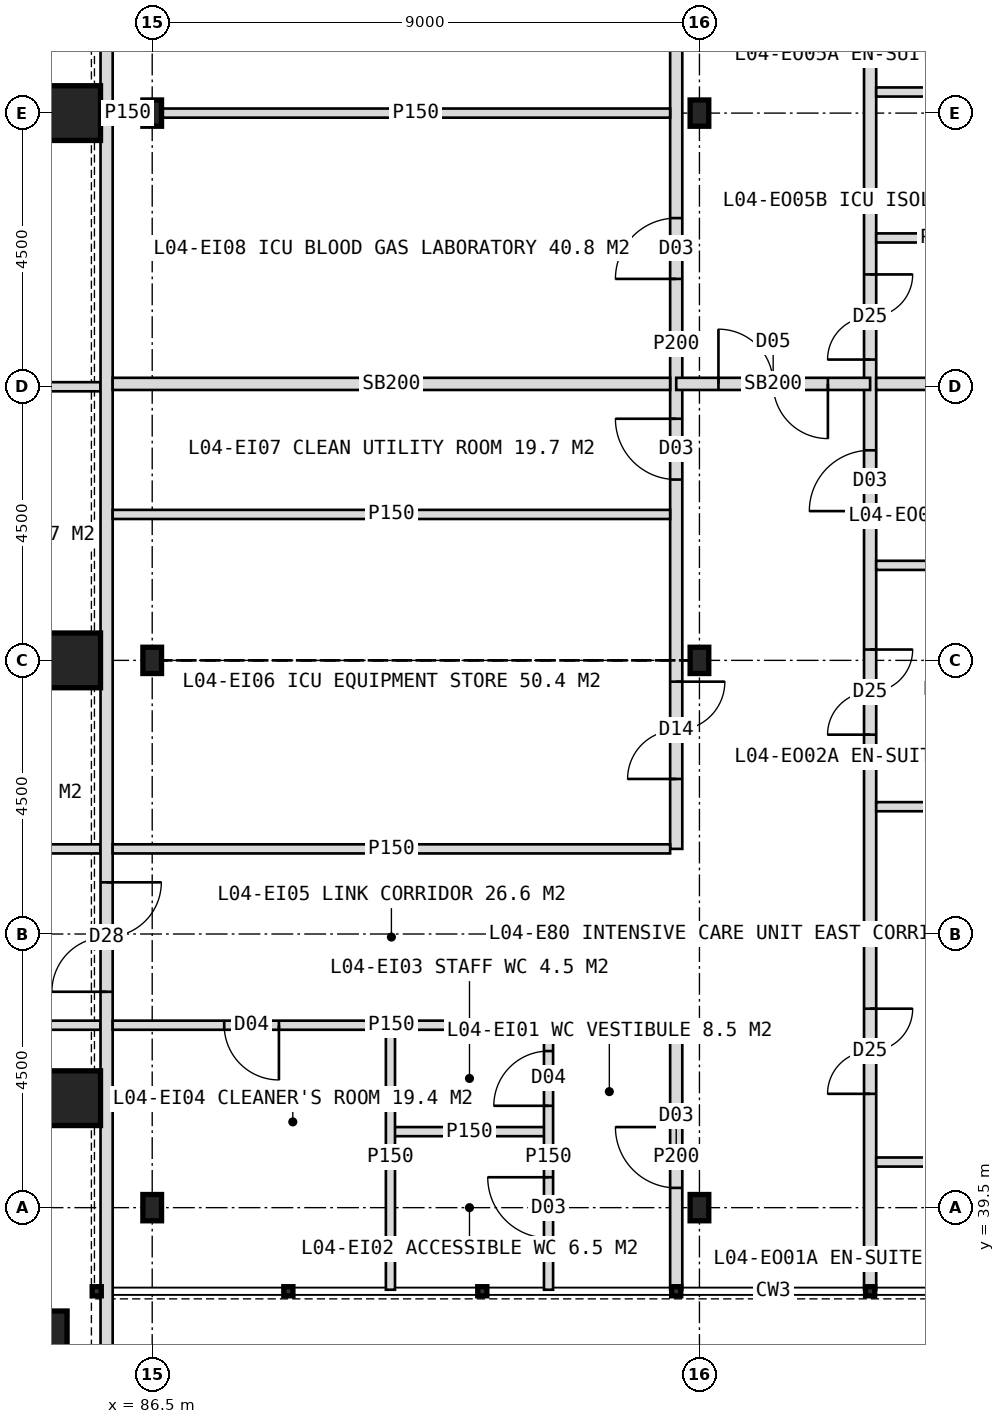
"""IFC4 building model, lengths in metres.
Left out: names, types, materials, properties, quantities, classifications, styles, units other than length and angle.
Written with IfcOpenShell. Run it as: python <this file> out.ifc"""

import sys

from ifc_helpers import new_model, si_unit, direction, frame, frame_2d, origin, origin_2d, place, context, subcontext, project, spatial, rectangle, hollow_rectangle, i_section, extrude, element, fill, save


model = new_model("IFC4")
c1 = context("Model", 3, precision=1e-05, world=origin(), true_north=direction((0.0, 1.0)))
c2 = subcontext(c1, "Body", "Model", "MODEL_VIEW")
j1 = project(units=[si_unit("LENGTHUNIT", "METRE"), si_unit("PLANEANGLEUNIT", "RADIAN")], contexts=[c1])
p1 = place(None, origin())
s1 = spatial("IfcSite", under=j1, at=p1, CompositionType="ELEMENT")
p2 = place(p1, origin())
s2 = spatial("IfcBuilding", under=s1, at=p2, CompositionType="ELEMENT")
p3 = place(p2, frame((0.0, 0.0, 21.0)))
s3 = spatial("IfcBuildingStorey", under=s2, at=p3, CompositionType="ELEMENT", Elevation=21.0)
for number, where, z_axis, x_axis in (
    (1, (85.2, 41.3, 0.0), (0.0, 0.0, 1.0), (1.0, 0.0, 0.0)),
    (2, (85.2, 48.5, 0.0), (0.0, 0.0, 1.0), (1.0, 0.0, 0.0)),
    (3, (85.2, 57.5, 0.0), (0.0, 0.0, 1.0), (1.0, 0.0, 0.0)),
    (4, (84.65, 37.35, 0.0), (0.0, 0.0, 1.0), (1.0, 0.0, 0.0)),
):
    element("IfcColumn", number, at=place(p3, frame(where, z_axis=z_axis, x_axis=x_axis)), inside=s3, PredefinedType="COLUMN", context=c2, shape_type="SweptSolid", body=[
        extrude(hollow_rectangle(XDim=0.9, YDim=0.9, WallThickness=0.08, at=origin_2d()), origin(), (0.0, 0.0, 1.0), 5.0),
    ])
for number, where, z_axis, x_axis in (
    (5, (86.5, 39.5, 0.0), (0.0, 0.0, 1.0), (1.0, 0.0, 0.0)),
    (6, (86.5, 48.5, 0.0), (0.0, 0.0, 1.0), (1.0, 0.0, 0.0)),
    (7, (86.5, 57.5, 0.0), (0.0, 0.0, 1.0), (1.0, 0.0, 0.0)),
    (8, (95.5, 39.5, 0.0), (0.0, 0.0, 1.0), (1.0, 0.0, 0.0)),
    (9, (95.5, 48.5, 0.0), (0.0, 0.0, 1.0), (1.0, 0.0, 0.0)),
    (10, (95.5, 57.5, 0.0), (0.0, 0.0, 1.0), (1.0, 0.0, 0.0)),
):
    element("IfcColumn", number, at=place(p3, frame(where, z_axis=z_axis, x_axis=x_axis)), inside=s3, PredefinedType="COLUMN", context=c2, shape_type="SweptSolid", body=[
        extrude(i_section(OverallWidth=0.307, OverallDepth=0.432, WebThickness=0.021, FlangeThickness=0.04, FilletRadius=0.027, at=origin_2d()), origin(), (0.0, 0.0, 1.0), 5.0),
    ])
for number, where, z_axis, x_axis in (
    (11, (79.5, 53.0, 0.0), (0.0, 0.0, 1.0), (1.0, 0.0, 0.0)),
    (12, (79.5, 45.4, 0.0), (0.0, 0.0, 1.0), (1.0, 0.0, 0.0)),
    (13, (79.5, 42.5, 0.0), (0.0, 0.0, 1.0), (1.0, 0.0, 0.0)),
):
    element("IfcWall", number, at=place(p3, frame(where, z_axis=z_axis, x_axis=x_axis)), inside=s3, PredefinedType="PARTITIONING", context=c2, shape_type="SweptSolid", body=[
        extrude(rectangle(XDim=6.15, YDim=0.15, at=frame_2d((3.075, 0.0))), origin(), (0.0, 0.0, 1.0), 4.7),
    ])
p4 = place(p3, frame((98.307, 38.15, 0.0), z_axis=(0.0, 0.0, 1.0), x_axis=(0.0, 1.0, 0.0)))
e14 = element("IfcWall", 14, at=p4, inside=s3, PredefinedType="PARTITIONING", context=c2, shape_type="SweptSolid", body=[
    extrude(rectangle(XDim=47.7, YDim=0.2, at=frame_2d((23.85, 0.0))), origin(), (0.0, 0.0, 1.0), 4.7),
])
p5 = place(p4, frame((45.7, 0.0, 0.0)))
e15 = element("IfcOpeningElement", 15, at=p5, cuts=e14, PredefinedType="OPENING", context=c2, shape_type="SweptSolid", body=[
    extrude(rectangle(XDim=1.2, YDim=2.1, at=frame_2d((0.6, 1.05))), frame((0.0, 0.11, 0.0), z_axis=(0.0, -1.0, 0.0), x_axis=(1.0, 0.0, 0.0)), (0.0, 0.0, 1.0), 0.22),
])
p6 = place(p4, frame((36.244, 0.0, 0.0)))
e16 = element("IfcOpeningElement", 16, at=p6, cuts=e14, PredefinedType="OPENING", context=c2, shape_type="SweptSolid", body=[
    extrude(rectangle(XDim=1.0, YDim=2.1, at=frame_2d((0.5, 1.05))), frame((0.0, 0.11, 0.0), z_axis=(0.0, -1.0, 0.0), x_axis=(1.0, 0.0, 0.0)), (0.0, 0.0, 1.0), 0.22),
])
p7 = place(p4, frame((15.297, 0.0, 0.0)))
e17 = element("IfcOpeningElement", 17, at=p7, cuts=e14, PredefinedType="OPENING", context=c2, shape_type="SweptSolid", body=[
    extrude(rectangle(XDim=1.4, YDim=2.2, at=frame_2d((0.7, 1.1))), frame((0.0, 0.11, 0.0), z_axis=(0.0, -1.0, 0.0), x_axis=(1.0, 0.0, 0.0)), (0.0, 0.0, 1.0), 0.22),
])
p8 = place(p4, frame((3.222, 0.0, 0.0)))
e18 = element("IfcOpeningElement", 18, at=p8, cuts=e14, PredefinedType="OPENING", context=c2, shape_type="SweptSolid", body=[
    extrude(rectangle(XDim=1.4, YDim=2.2, at=frame_2d((0.7, 1.1))), frame((0.0, 0.11, 0.0), z_axis=(0.0, -1.0, 0.0), x_axis=(1.0, 0.0, 0.0)), (0.0, 0.0, 1.0), 0.22),
])
p9 = place(p4, frame((9.128, 0.0, 0.0)))
e19 = element("IfcOpeningElement", 19, at=p9, cuts=e14, PredefinedType="OPENING", context=c2, shape_type="SweptSolid", body=[
    extrude(rectangle(XDim=1.4, YDim=2.2, at=frame_2d((0.7, 1.1))), frame((0.0, 0.11, 0.0), z_axis=(0.0, -1.0, 0.0), x_axis=(1.0, 0.0, 0.0)), (0.0, 0.0, 1.0), 0.22),
])
p10 = place(p4, frame((12.805, 0.0, 0.0)))
e20 = element("IfcOpeningElement", 20, at=p10, cuts=e14, PredefinedType="OPENING", context=c2, shape_type="SweptSolid", body=[
    extrude(rectangle(XDim=1.0, YDim=2.1, at=frame_2d((0.5, 1.05))), frame((0.0, 0.11, 0.0), z_axis=(0.0, -1.0, 0.0), x_axis=(1.0, 0.0, 0.0)), (0.0, 0.0, 1.0), 0.22),
])
p11 = place(p4, frame((24.05, 0.0, 0.0)))
e21 = element("IfcOpeningElement", 21, at=p11, cuts=e14, PredefinedType="OPENING", context=c2, shape_type="SweptSolid", body=[
    extrude(rectangle(XDim=1.4, YDim=2.2, at=frame_2d((0.7, 1.1))), frame((0.0, 0.11, 0.0), z_axis=(0.0, -1.0, 0.0), x_axis=(1.0, 0.0, 0.0)), (0.0, 0.0, 1.0), 0.22),
])
p12 = place(p4, frame((30.019, 0.0, 0.0)))
e22 = element("IfcOpeningElement", 22, at=p12, cuts=e14, PredefinedType="OPENING", context=c2, shape_type="SweptSolid", body=[
    extrude(rectangle(XDim=1.4, YDim=2.2, at=frame_2d((0.7, 1.1))), frame((0.0, 0.11, 0.0), z_axis=(0.0, -1.0, 0.0), x_axis=(1.0, 0.0, 0.0)), (0.0, 0.0, 1.0), 0.22),
])
p13 = place(p4, frame((33.695, 0.0, 0.0)))
e23 = element("IfcOpeningElement", 23, at=p13, cuts=e14, PredefinedType="OPENING", context=c2, shape_type="SweptSolid", body=[
    extrude(rectangle(XDim=1.0, YDim=2.1, at=frame_2d((0.5, 1.05))), frame((0.0, 0.11, 0.0), z_axis=(0.0, -1.0, 0.0), x_axis=(1.0, 0.0, 0.0)), (0.0, 0.0, 1.0), 0.22),
])
p14 = place(p3, frame((95.118, 38.15, 0.0), z_axis=(0.0, 0.0, 1.0), x_axis=(0.0, 1.0, 0.0)))
e24 = element("IfcWall", 24, at=p14, inside=s3, PredefinedType="PARTITIONING", context=c2, shape_type="SweptSolid", body=[
    extrude(rectangle(XDim=4.35, YDim=0.2, at=frame_2d((2.175, 0.0))), origin(), (0.0, 0.0, 1.0), 4.7),
])
p15 = place(p14, frame((1.675, 0.0, 0.0)))
e25 = element("IfcOpeningElement", 25, at=p15, cuts=e24, PredefinedType="OPENING", context=c2, shape_type="SweptSolid", body=[
    extrude(rectangle(XDim=1.0, YDim=2.1, at=frame_2d((0.5, 1.05))), frame((0.0, 0.11, 0.0), z_axis=(0.0, -1.0, 0.0), x_axis=(1.0, 0.0, 0.0)), (0.0, 0.0, 1.0), 0.22),
])
p16 = place(p3, frame((95.118, 45.4, 0.0), z_axis=(0.0, 0.0, 1.0), x_axis=(0.0, 1.0, 0.0)))
e26 = element("IfcWall", 26, at=p16, inside=s3, PredefinedType="PARTITIONING", context=c2, shape_type="SweptSolid", body=[
    extrude(rectangle(XDim=16.6, YDim=0.2, at=frame_2d((8.3, 0.0))), origin(), (0.0, 0.0, 1.0), 4.7),
])
p17 = place(p16, frame((1.15, 0.0, 0.0)))
e27 = element("IfcOpeningElement", 27, at=p17, cuts=e26, PredefinedType="OPENING", context=c2, shape_type="SweptSolid", body=[
    extrude(rectangle(XDim=1.6, YDim=2.2, at=frame_2d((0.8, 1.1))), frame((0.0, 0.11, 0.0), z_axis=(0.0, -1.0, 0.0), x_axis=(1.0, 0.0, 0.0)), (0.0, 0.0, 1.0), 0.22),
])
p18 = place(p16, frame((6.073, 0.0, 0.0)))
e28 = element("IfcOpeningElement", 28, at=p18, cuts=e26, PredefinedType="OPENING", context=c2, shape_type="SweptSolid", body=[
    extrude(rectangle(XDim=1.0, YDim=2.1, at=frame_2d((0.5, 1.05))), frame((0.0, 0.11, 0.0), z_axis=(0.0, -1.0, 0.0), x_axis=(1.0, 0.0, 0.0)), (0.0, 0.0, 1.0), 0.22),
])
p19 = place(p16, frame((9.374, 0.0, 0.0)))
e29 = element("IfcOpeningElement", 29, at=p19, cuts=e26, PredefinedType="OPENING", context=c2, shape_type="SweptSolid", body=[
    extrude(rectangle(XDim=1.0, YDim=2.1, at=frame_2d((0.5, 1.05))), frame((0.0, 0.11, 0.0), z_axis=(0.0, -1.0, 0.0), x_axis=(1.0, 0.0, 0.0)), (0.0, 0.0, 1.0), 0.22),
])
p20 = place(p16, frame((13.85, 0.0, 0.0)))
e30 = element("IfcOpeningElement", 30, at=p20, cuts=e26, PredefinedType="OPENING", context=c2, shape_type="SweptSolid", body=[
    extrude(rectangle(XDim=1.0, YDim=2.1, at=frame_2d((0.5, 1.05))), frame((0.0, 0.11, 0.0), z_axis=(0.0, -1.0, 0.0), x_axis=(1.0, 0.0, 0.0)), (0.0, 0.0, 1.0), 0.22),
])
p21 = place(p3, frame((98.307, 53.047, 0.0), z_axis=(0.0, 0.0, 1.0), x_axis=(-1.0, 0.0, 0.0)))
e31 = element("IfcWall", 31, at=p21, inside=s3, PredefinedType="SOLIDWALL", context=c2, shape_type="SweptSolid", body=[
    extrude(rectangle(XDim=3.189, YDim=0.2, at=frame_2d((1.594, 0.0))), origin(), (0.0, 0.0, 1.0), 4.7),
])
p22 = place(p21, frame((0.695, 0.0, 0.0)))
e32 = element("IfcOpeningElement", 32, at=p22, cuts=e31, PredefinedType="OPENING", context=c2, shape_type="SweptSolid", body=[
    extrude(rectangle(XDim=1.8, YDim=2.2, at=frame_2d((0.9, 1.1))), frame((0.0, 0.11, 0.0), z_axis=(0.0, -1.0, 0.0), x_axis=(1.0, 0.0, 0.0)), (0.0, 0.0, 1.0), 0.22),
])
p23 = place(p3, frame((85.75, 36.8, 0.0), z_axis=(0.0, 0.0, 1.0), x_axis=(0.0, 1.0, 0.0)))
e33 = element("IfcWall", 33, at=p23, inside=s3, PredefinedType="SOLIDWALL", context=c2, shape_type="SweptSolid", body=[
    extrude(rectangle(XDim=50.4, YDim=0.2, at=frame_2d((25.2, 0.0))), origin(), (0.0, 0.0, 1.0), 4.7),
])
p24 = place(p23, frame((6.25, 0.0, 0.0)))
e34 = element("IfcOpeningElement", 34, at=p24, cuts=e33, PredefinedType="OPENING", context=c2, shape_type="SweptSolid", body=[
    extrude(rectangle(XDim=1.8, YDim=2.2, at=frame_2d((0.9, 1.1))), frame((0.0, 0.11, 0.0), z_axis=(0.0, -1.0, 0.0), x_axis=(1.0, 0.0, 0.0)), (0.0, 0.0, 1.0), 0.22),
])
p25 = place(p23, frame((25.55, 0.0, 0.0)))
e35 = element("IfcOpeningElement", 35, at=p25, cuts=e33, PredefinedType="OPENING", context=c2, shape_type="SweptSolid", body=[
    extrude(rectangle(XDim=1.8, YDim=2.2, at=frame_2d((0.9, 1.1))), frame((0.0, 0.11, 0.0), z_axis=(0.0, -1.0, 0.0), x_axis=(1.0, 0.0, 0.0)), (0.0, 0.0, 1.0), 0.22),
])
for number, where, z_axis, x_axis in (
    (36, (107.85, 44.094, 0.0), (0.0, 0.0, 1.0), (-1.0, 0.0, 0.0)),
    (37, (107.85, 50.062, 0.0), (0.0, 0.0, 1.0), (-1.0, 0.0, 0.0)),
):
    element("IfcWall", number, at=place(p3, frame(where, z_axis=z_axis, x_axis=x_axis)), inside=s3, PredefinedType="PARTITIONING", context=c2, shape_type="SweptSolid", body=[
        extrude(rectangle(XDim=9.443, YDim=0.15, at=frame_2d((4.722, 0.0))), origin(), (0.0, 0.0, 1.0), 4.7),
    ])
p26 = place(p3, frame((107.85, 53.047, 0.0), z_axis=(0.0, 0.0, 1.0), x_axis=(-1.0, 0.0, 0.0)))
e38 = element("IfcWall", 38, at=p26, inside=s3, PredefinedType="SOLIDWALL", context=c2, shape_type="SweptSolid", body=[
    extrude(rectangle(XDim=9.443, YDim=0.2, at=frame_2d((4.722, 0.0))), origin(), (0.0, 0.0, 1.0), 4.7),
])
for number, where, z_axis, x_axis in (
    (39, (98.407, 40.25, 0.0), (0.0, 0.0, 1.0), (1.0, 0.0, 0.0)),
    (40, (98.407, 46.094, 0.0), (0.0, 0.0, 1.0), (1.0, 0.0, 0.0)),
    (41, (98.407, 55.447, 0.0), (0.0, 0.0, 1.0), (1.0, 0.0, 0.0)),
    (42, (98.407, 57.847, 0.0), (0.0, 0.0, 1.0), (1.0, 0.0, 0.0)),
):
    element("IfcWall", number, at=place(p3, frame(where, z_axis=z_axis, x_axis=x_axis)), inside=s3, PredefinedType="PARTITIONING", context=c2, shape_type="SweptSolid", body=[
        extrude(rectangle(XDim=2.4, YDim=0.15, at=frame_2d((1.2, 0.0))), origin(), (0.0, 0.0, 1.0), 4.7),
    ])
p27 = place(p3, frame((93.018, 40.75, 0.0), z_axis=(0.0, 0.0, 1.0), x_axis=(-1.0, 0.0, 0.0)))
e43 = element("IfcWall", 43, at=p27, inside=s3, PredefinedType="PARTITIONING", context=c2, shape_type="SweptSolid", body=[
    extrude(rectangle(XDim=2.6, YDim=0.15, at=frame_2d((1.3, 0.0))), origin(), (0.0, 0.0, 1.0), 4.7),
])
p28 = place(p3, frame((95.018, 42.5, 0.0), z_axis=(0.0, 0.0, 1.0), x_axis=(-1.0, 0.0, 0.0)))
e44 = element("IfcWall", 44, at=p28, inside=s3, PredefinedType="PARTITIONING", context=c2, shape_type="SweptSolid", body=[
    extrude(rectangle(XDim=9.168, YDim=0.15, at=frame_2d((4.584, 0.0))), origin(), (0.0, 0.0, 1.0), 4.7),
])
p29 = place(p28, frame((6.434, 0.0, 0.0)))
e45 = element("IfcOpeningElement", 45, at=p29, cuts=e44, PredefinedType="OPENING", context=c2, shape_type="SweptSolid", body=[
    extrude(rectangle(XDim=0.9, YDim=2.1, at=frame_2d((0.45, 1.05))), frame((0.0, 0.085, 0.0), z_axis=(0.0, -1.0, 0.0), x_axis=(1.0, 0.0, 0.0)), (0.0, 0.0, 1.0), 0.17),
])
for number, where, z_axis, x_axis in (
    (46, (95.018, 45.4, 0.0), (0.0, 0.0, 1.0), (-1.0, 0.0, 0.0)),
    (47, (95.018, 50.9, 0.0), (0.0, 0.0, 1.0), (-1.0, 0.0, 0.0)),
):
    element("IfcWall", number, at=place(p3, frame(where, z_axis=z_axis, x_axis=x_axis)), inside=s3, PredefinedType="PARTITIONING", context=c2, shape_type="SweptSolid", body=[
        extrude(rectangle(XDim=9.168, YDim=0.15, at=frame_2d((4.584, 0.0))), origin(), (0.0, 0.0, 1.0), 4.7),
    ])
p30 = place(p3, frame((95.018, 53.047, 0.0), z_axis=(0.0, 0.0, 1.0), x_axis=(-1.0, 0.0, 0.0)))
e48 = element("IfcWall", 48, at=p30, inside=s3, PredefinedType="SOLIDWALL", context=c2, shape_type="SweptSolid", body=[
    extrude(rectangle(XDim=9.168, YDim=0.2, at=frame_2d((4.584, 0.0))), origin(), (0.0, 0.0, 1.0), 4.7),
])
p31 = place(p3, frame((95.018, 57.5, 0.0), z_axis=(0.0, 0.0, 1.0), x_axis=(-1.0, 0.0, 0.0)))
e49 = element("IfcWall", 49, at=p31, inside=s3, PredefinedType="PARTITIONING", context=c2, shape_type="SweptSolid", body=[
    extrude(rectangle(XDim=8.365, YDim=0.15, at=frame_2d((4.182, 0.0))), origin(), (0.0, 0.0, 1.0), 3.7),
])
p32 = place(p3, frame((86.346, 57.5, 0.0), z_axis=(0.0, 0.0, 1.0), x_axis=(-1.0, 0.0, 0.0)))
e50 = element("IfcWall", 50, at=p32, inside=s3, PredefinedType="PARTITIONING", context=c2, shape_type="SweptSolid", body=[
    extrude(rectangle(XDim=0.496, YDim=0.15, at=frame_2d((0.248, 0.0))), origin(), (0.0, 0.0, 1.0), 4.7),
])
p33 = place(p3, frame((93.018, 38.15, 0.0), z_axis=(0.0, 0.0, 1.0), x_axis=(0.0, 1.0, 0.0)))
e51 = element("IfcWall", 51, at=p33, inside=s3, PredefinedType="PARTITIONING", context=c2, shape_type="SweptSolid", body=[
    extrude(rectangle(XDim=4.35, YDim=0.15, at=frame_2d((2.175, 0.0))), origin(), (0.0, 0.0, 1.0), 4.7),
])
p34 = place(p33, frame((0.85, 0.0, 0.0)))
e52 = element("IfcOpeningElement", 52, at=p34, cuts=e51, PredefinedType="OPENING", context=c2, shape_type="SweptSolid", body=[
    extrude(rectangle(XDim=1.0, YDim=2.1, at=frame_2d((0.5, 1.05))), frame((0.0, 0.085, 0.0), z_axis=(0.0, -1.0, 0.0), x_axis=(1.0, 0.0, 0.0)), (0.0, 0.0, 1.0), 0.17),
])
p35 = place(p33, frame((3.025, 0.0, 0.0)))
e53 = element("IfcOpeningElement", 53, at=p35, cuts=e51, PredefinedType="OPENING", context=c2, shape_type="SweptSolid", body=[
    extrude(rectangle(XDim=0.9, YDim=2.1, at=frame_2d((0.45, 1.05))), frame((0.0, 0.085, 0.0), z_axis=(0.0, -1.0, 0.0), x_axis=(1.0, 0.0, 0.0)), (0.0, 0.0, 1.0), 0.17),
])
p36 = place(p3, frame((90.418, 38.15, 0.0), z_axis=(0.0, 0.0, 1.0), x_axis=(0.0, 1.0, 0.0)))
e54 = element("IfcWall", 54, at=p36, inside=s3, PredefinedType="PARTITIONING", context=c2, shape_type="SweptSolid", body=[
    extrude(rectangle(XDim=4.35, YDim=0.15, at=frame_2d((2.175, 0.0))), origin(), (0.0, 0.0, 1.0), 4.7),
])
p37 = place(p22, origin())
e55 = element("IfcDoor", 55, at=p37, inside=s3, OperationType="DOUBLE_DOOR_DOUBLE_SWING", PredefinedType="DOOR", context=c2, shape_type="SweptSolid", body=[
    extrude(rectangle(XDim=1.8, YDim=2.2, at=frame_2d((0.9, 1.1))), frame((0.0, 0.025, 0.0), z_axis=(0.0, -1.0, 0.0), x_axis=(1.0, 0.0, 0.0)), (0.0, 0.0, 1.0), 0.05),
])
fill(e32, e55)
p38 = place(p24, origin())
e56 = element("IfcDoor", 56, at=p38, inside=s3, OperationType="DOUBLE_DOOR_SINGLE_SWING", PredefinedType="DOOR", context=c2, shape_type="SweptSolid", body=[
    extrude(rectangle(XDim=1.8, YDim=2.2, at=frame_2d((0.9, 1.1))), frame((0.0, 0.025, 0.0), z_axis=(0.0, -1.0, 0.0), x_axis=(1.0, 0.0, 0.0)), (0.0, 0.0, 1.0), 0.05),
])
fill(e34, e56)
p39 = place(p7, origin())
e57 = element("IfcDoor", 57, at=p39, inside=s3, OperationType="DOUBLE_DOOR_SINGLE_SWING", PredefinedType="DOOR", context=c2, shape_type="SweptSolid", body=[
    extrude(rectangle(XDim=1.4, YDim=2.2, at=frame_2d((0.7, 1.1))), frame((0.0, 0.025, 0.0), z_axis=(0.0, -1.0, 0.0), x_axis=(1.0, 0.0, 0.0)), (0.0, 0.0, 1.0), 0.05),
])
fill(e17, e57)
p40 = place(p8, origin())
e58 = element("IfcDoor", 58, at=p40, inside=s3, OperationType="DOUBLE_DOOR_SINGLE_SWING", PredefinedType="DOOR", context=c2, shape_type="SweptSolid", body=[
    extrude(rectangle(XDim=1.4, YDim=2.2, at=frame_2d((0.7, 1.1))), frame((0.0, 0.025, 0.0), z_axis=(0.0, -1.0, 0.0), x_axis=(1.0, 0.0, 0.0)), (0.0, 0.0, 1.0), 0.05),
])
fill(e18, e58)
p41 = place(p9, origin())
e59 = element("IfcDoor", 59, at=p41, inside=s3, OperationType="DOUBLE_DOOR_SINGLE_SWING", PredefinedType="DOOR", context=c2, shape_type="SweptSolid", body=[
    extrude(rectangle(XDim=1.4, YDim=2.2, at=frame_2d((0.7, 1.1))), frame((0.0, 0.025, 0.0), z_axis=(0.0, -1.0, 0.0), x_axis=(1.0, 0.0, 0.0)), (0.0, 0.0, 1.0), 0.05),
])
fill(e19, e59)
p42 = place(p10, origin())
e60 = element("IfcDoor", 60, at=p42, inside=s3, OperationType="SINGLE_SWING_LEFT", PredefinedType="DOOR", context=c2, shape_type="SweptSolid", body=[
    extrude(rectangle(XDim=1.0, YDim=2.1, at=frame_2d((0.5, 1.05))), frame((0.0, 0.025, 0.0), z_axis=(0.0, -1.0, 0.0), x_axis=(1.0, 0.0, 0.0)), (0.0, 0.0, 1.0), 0.05),
])
fill(e20, e60)
p43 = place(p15, origin())
e61 = element("IfcDoor", 61, at=p43, inside=s3, OperationType="SINGLE_SWING_RIGHT", PredefinedType="DOOR", context=c2, shape_type="SweptSolid", body=[
    extrude(rectangle(XDim=1.0, YDim=2.1, at=frame_2d((0.5, 1.05))), frame((0.0, 0.025, 0.0), z_axis=(0.0, -1.0, 0.0), x_axis=(1.0, 0.0, 0.0)), (0.0, 0.0, 1.0), 0.05),
])
fill(e25, e61)
p44 = place(p34, origin())
e62 = element("IfcDoor", 62, at=p44, inside=s3, OperationType="SINGLE_SWING_RIGHT", PredefinedType="DOOR", context=c2, shape_type="SweptSolid", body=[
    extrude(rectangle(XDim=1.0, YDim=2.1, at=frame_2d((0.5, 1.05))), frame((0.0, 0.025, 0.0), z_axis=(0.0, -1.0, 0.0), x_axis=(1.0, 0.0, 0.0)), (0.0, 0.0, 1.0), 0.05),
])
fill(e52, e62)
p45 = place(p35, origin())
e63 = element("IfcDoor", 63, at=p45, inside=s3, OperationType="SINGLE_SWING_LEFT", PredefinedType="DOOR", context=c2, shape_type="SweptSolid", body=[
    extrude(rectangle(XDim=0.9, YDim=2.1, at=frame_2d((0.45, 1.05))), frame((0.0, 0.025, 0.0), z_axis=(0.0, -1.0, 0.0), x_axis=(1.0, 0.0, 0.0)), (0.0, 0.0, 1.0), 0.05),
])
fill(e53, e63)
p46 = place(p29, origin())
e64 = element("IfcDoor", 64, at=p46, inside=s3, OperationType="SINGLE_SWING_LEFT", PredefinedType="DOOR", context=c2, shape_type="SweptSolid", body=[
    extrude(rectangle(XDim=0.9, YDim=2.1, at=frame_2d((0.45, 1.05))), frame((0.0, 0.025, 0.0), z_axis=(0.0, -1.0, 0.0), x_axis=(1.0, 0.0, 0.0)), (0.0, 0.0, 1.0), 0.05),
])
fill(e45, e64)
p47 = place(p17, origin())
e65 = element("IfcDoor", 65, at=p47, inside=s3, OperationType="DOUBLE_DOOR_DOUBLE_SWING", PredefinedType="DOOR", context=c2, shape_type="SweptSolid", body=[
    extrude(rectangle(XDim=1.6, YDim=2.2, at=frame_2d((0.8, 1.1))), frame((0.0, 0.025, 0.0), z_axis=(0.0, -1.0, 0.0), x_axis=(1.0, 0.0, 0.0)), (0.0, 0.0, 1.0), 0.05),
])
fill(e27, e65)
p48 = place(p18, origin())
e66 = element("IfcDoor", 66, at=p48, inside=s3, OperationType="SINGLE_SWING_RIGHT", PredefinedType="DOOR", context=c2, shape_type="SweptSolid", body=[
    extrude(rectangle(XDim=1.0, YDim=2.1, at=frame_2d((0.5, 1.05))), frame((0.0, 0.025, 0.0), z_axis=(0.0, -1.0, 0.0), x_axis=(1.0, 0.0, 0.0)), (0.0, 0.0, 1.0), 0.05),
])
fill(e28, e66)
p49 = place(p19, origin())
e67 = element("IfcDoor", 67, at=p49, inside=s3, OperationType="SINGLE_SWING_LEFT", PredefinedType="DOOR", context=c2, shape_type="SweptSolid", body=[
    extrude(rectangle(XDim=1.0, YDim=2.1, at=frame_2d((0.5, 1.05))), frame((0.0, 0.025, 0.0), z_axis=(0.0, -1.0, 0.0), x_axis=(1.0, 0.0, 0.0)), (0.0, 0.0, 1.0), 0.05),
])
fill(e29, e67)
save(model, sys.argv[1])
